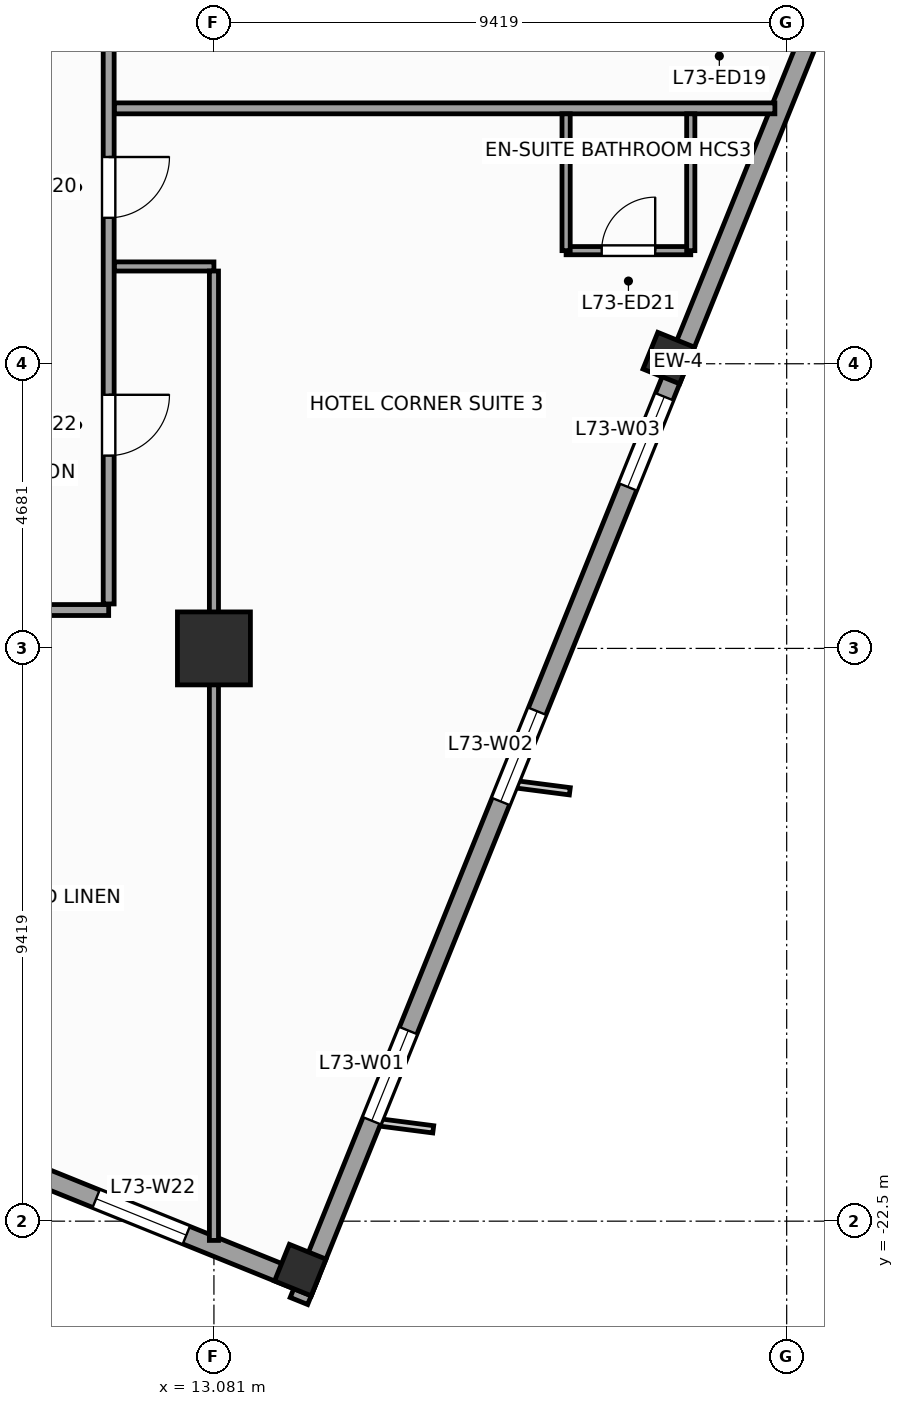
"""IFC4 building model, lengths in metres.
Left out: names, types, materials, properties, quantities, classifications, styles, units other than length and angle.
Written with IfcOpenShell. Run it as: python <this file> out.ifc"""

import sys

from ifc_helpers import new_model, si_unit, direction, frame, frame_2d, origin, origin_2d, place, context, subcontext, project, spatial, rectangle, extrude, source, transform, mapped, element, fill, save


model = new_model("IFC4")
c1 = context("Model", 3, precision=1e-05, world=origin(), true_north=direction((0.0, 1.0)))
c2 = subcontext(c1, "Body", "Model", "MODEL_VIEW")
j1 = project(units=[si_unit("LENGTHUNIT", "METRE"), si_unit("PLANEANGLEUNIT", "RADIAN")], contexts=[c1])
p1 = place(None, origin())
s1 = spatial("IfcSite", under=j1, at=p1, CompositionType="ELEMENT")
p2 = place(p1, origin())
s2 = spatial("IfcBuilding", under=s1, at=p2, CompositionType="ELEMENT")
p3 = place(p2, frame((0.0, 0.0, 297.6)))
s3 = spatial("IfcBuildingStorey", under=s2, at=p3, CompositionType="ELEMENT", Elevation=297.6)
m1 = source(origin(), c2, "Body", "SweptSolid", [
    extrude(rectangle(XDim=1.2, YDim=1.2, at=origin_2d()), origin(), (0.0, 0.0, 1.0), 3.6),
])
p4 = place(p3, frame((13.081, -13.081, 0.0), z_axis=(0.0, 0.0, 1.0), x_axis=(1.0, 0.0, 0.0)))
e1 = element("IfcColumn", 1, at=p4, inside=s3, PredefinedType="COLUMN", context=c2, shape_type="MappedRepresentation", body=[
    mapped(m1, transform((0.0, 0.0, 0.0), scale=1.0)),
])
m2 = source(origin(), c2, "Body", "SweptSolid", [
    extrude(rectangle(XDim=0.65, YDim=0.65, at=origin_2d()), origin(), (0.0, 0.0, 1.0), 3.6),
])
for number, where, z_axis, x_axis in (
    (2, (14.501, -23.304, 0.0), (0.0, 0.0, 1.0), (0.375, 0.927, 0.0)),
    (3, (20.56, -8.307, 0.0), (0.0, 0.0, 1.0), (0.375, 0.927, 0.0)),
):
    element("IfcColumn", number, at=place(p3, frame(where, z_axis=z_axis, x_axis=x_axis)), inside=s3, PredefinedType="COLUMN", context=c2, shape_type="MappedRepresentation", body=[
        mapped(m2, transform((0.0, 0.0, 0.0), scale=1.0)),
    ])
p5 = place(p3, frame((14.479, -23.813, 0.0), z_axis=(0.0, 0.0, 1.0), x_axis=(0.374609557019, 0.927182657188, 0.0)))
e4 = element("IfcWall", 4, at=p5, inside=s3, PredefinedType="STANDARD", context=c2, shape_type="SweptSolid", body=[
    extrude(rectangle(XDim=33.31, YDim=0.31, at=frame_2d((16.655, 0.0))), origin(), (0.0, 0.0, 1.0), 2.75),
])
p6 = place(p5, frame((3.197, 0.0, 0.47)))
e5 = element("IfcOpeningElement", 5, at=p6, cuts=e4, PredefinedType="OPENING", context=c2, shape_type="SweptSolid", body=[
    extrude(rectangle(XDim=1.6, YDim=2.1, at=frame_2d((0.8, 1.05))), frame((0.0, 0.165, 0.0), z_axis=(0.0, -1.0, 0.0), x_axis=(1.0, 0.0, 0.0)), (0.0, 0.0, 1.0), 0.33),
])
p7 = place(p5, frame((8.86, 0.0, 0.47)))
e6 = element("IfcOpeningElement", 6, at=p7, cuts=e4, PredefinedType="OPENING", context=c2, shape_type="SweptSolid", body=[
    extrude(rectangle(XDim=1.6, YDim=2.1, at=frame_2d((0.8, 1.05))), frame((0.0, 0.165, 0.0), z_axis=(0.0, -1.0, 0.0), x_axis=(1.0, 0.0, 0.0)), (0.0, 0.0, 1.0), 0.33),
])
p8 = place(p5, frame((14.439, 0.0, 0.47)))
e7 = element("IfcOpeningElement", 7, at=p8, cuts=e4, PredefinedType="OPENING", context=c2, shape_type="SweptSolid", body=[
    extrude(rectangle(XDim=1.6, YDim=2.1, at=frame_2d((0.8, 1.05))), frame((0.0, 0.165, 0.0), z_axis=(0.0, -1.0, 0.0), x_axis=(1.0, 0.0, 0.0)), (0.0, 0.0, 1.0), 0.33),
])
p9 = place(p5, frame((30.097, 0.0, 0.47)))
e8 = element("IfcOpeningElement", 8, at=p9, cuts=e4, PredefinedType="OPENING", context=c2, shape_type="SweptSolid", body=[
    extrude(rectangle(XDim=1.6, YDim=2.1, at=frame_2d((0.8, 1.05))), frame((0.0, 0.165, 0.0), z_axis=(0.0, -1.0, 0.0), x_axis=(1.0, 0.0, 0.0)), (0.0, 0.0, 1.0), 0.33),
])
p10 = place(p5, frame((27.59, 0.0, 0.47)))
e9 = element("IfcOpeningElement", 9, at=p10, cuts=e4, PredefinedType="OPENING", context=c2, shape_type="SweptSolid", body=[
    extrude(rectangle(XDim=1.6, YDim=2.1, at=frame_2d((0.8, 1.05))), frame((0.0, 0.165, 0.0), z_axis=(0.0, -1.0, 0.0), x_axis=(1.0, 0.0, 0.0)), (0.0, 0.0, 1.0), 0.33),
])
p11 = place(p5, frame((22.952, 0.0, 0.47)))
e10 = element("IfcOpeningElement", 10, at=p11, cuts=e4, PredefinedType="OPENING", context=c2, shape_type="SweptSolid", body=[
    extrude(rectangle(XDim=1.6, YDim=2.1, at=frame_2d((0.8, 1.05))), frame((0.0, 0.165, 0.0), z_axis=(0.0, -1.0, 0.0), x_axis=(1.0, 0.0, 0.0)), (0.0, 0.0, 1.0), 0.33),
])
p12 = place(p3, frame((9.032, -21.278, 0.0), z_axis=(0.0, 0.0, 1.0), x_axis=(0.927185411764, -0.374602739196, 0.0)))
e11 = element("IfcWall", 11, at=p12, inside=s3, PredefinedType="STANDARD", context=c2, shape_type="SweptSolid", body=[
    extrude(rectangle(XDim=6.155, YDim=0.31, at=frame_2d((3.078, 0.0))), origin(), (0.0, 0.0, 1.0), 3.35),
])
p13 = place(p12, frame((2.278, 0.0, 0.47)))
e12 = element("IfcOpeningElement", 12, at=p13, cuts=e11, PredefinedType="OPENING", context=c2, shape_type="SweptSolid", body=[
    extrude(rectangle(XDim=1.6, YDim=2.1, at=frame_2d((0.8, 1.05))), frame((0.0, 0.165, 0.0), z_axis=(0.0, -1.0, 0.0), x_axis=(1.0, 0.0, 0.0)), (0.0, 0.0, 1.0), 0.33),
])
p14 = place(p3, frame((-10.3, -12.45, 0.0), z_axis=(0.0, 0.0, 1.0), x_axis=(1.0, 0.0, 0.0)))
e13 = element("IfcWall", 13, at=p14, inside=s3, PredefinedType="PARTITIONING", context=c2, shape_type="SweptSolid", body=[
    extrude(rectangle(XDim=21.65, YDim=0.18, at=frame_2d((10.825, 0.0))), origin(), (0.0, 0.0, 1.0), 3.35),
])
p15 = place(p14, frame((14.786, 0.0, 0.0)))
e14 = element("IfcOpeningElement", 14, at=p15, cuts=e13, PredefinedType="OPENING", context=c2, shape_type="SweptSolid", body=[
    extrude(rectangle(XDim=0.95, YDim=2.1, at=frame_2d((0.475, 1.05))), frame((0.0, 0.1, 0.0), z_axis=(0.0, -1.0, 0.0), x_axis=(1.0, 0.0, 0.0)), (0.0, 0.0, 1.0), 0.2),
])
p16 = place(p14, frame((9.8, 0.0, 0.0)))
e15 = element("IfcOpeningElement", 15, at=p16, cuts=e13, PredefinedType="OPENING", context=c2, shape_type="SweptSolid", body=[
    extrude(rectangle(XDim=1.0, YDim=2.15, at=frame_2d((0.5, 1.075))), frame((0.0, 0.1, 0.0), z_axis=(0.0, -1.0, 0.0), x_axis=(1.0, 0.0, 0.0)), (0.0, 0.0, 1.0), 0.2),
])
p17 = place(p14, frame((3.064, 0.0, 0.0)))
e16 = element("IfcOpeningElement", 16, at=p17, cuts=e13, PredefinedType="OPENING", context=c2, shape_type="SweptSolid", body=[
    extrude(rectangle(XDim=1.0, YDim=2.15, at=frame_2d((0.5, 1.075))), frame((0.0, 0.1, 0.0), z_axis=(0.0, -1.0, 0.0), x_axis=(1.0, 0.0, 0.0)), (0.0, 0.0, 1.0), 0.2),
])
p18 = place(p3, frame((11.35, -12.35, 0.0), z_axis=(0.0, 0.0, 1.0), x_axis=(0.0, 1.0, 0.0)))
e17 = element("IfcWall", 17, at=p18, inside=s3, PredefinedType="PARTITIONING", context=c2, shape_type="SweptSolid", body=[
    extrude(rectangle(XDim=22.55, YDim=0.18, at=frame_2d((11.275, 0.0))), origin(), (0.0, 0.0, 1.0), 3.35),
])
p19 = place(p18, frame((17.15, 0.0, 0.0)))
e18 = element("IfcOpeningElement", 18, at=p19, cuts=e17, PredefinedType="OPENING", context=c2, shape_type="SweptSolid", body=[
    extrude(rectangle(XDim=1.0, YDim=2.15, at=frame_2d((0.5, 1.075))), frame((0.0, 0.1, 0.0), z_axis=(0.0, -1.0, 0.0), x_axis=(1.0, 0.0, 0.0)), (0.0, 0.0, 1.0), 0.2),
])
p20 = place(p18, frame((13.5, 0.0, 0.0)))
e19 = element("IfcOpeningElement", 19, at=p20, cuts=e17, PredefinedType="OPENING", context=c2, shape_type="SweptSolid", body=[
    extrude(rectangle(XDim=1.0, YDim=2.15, at=frame_2d((0.5, 1.075))), frame((0.0, 0.1, 0.0), z_axis=(0.0, -1.0, 0.0), x_axis=(1.0, 0.0, 0.0)), (0.0, 0.0, 1.0), 0.2),
])
p21 = place(p18, frame((9.5, 0.0, 0.0)))
e20 = element("IfcOpeningElement", 20, at=p21, cuts=e17, PredefinedType="OPENING", context=c2, shape_type="SweptSolid", body=[
    extrude(rectangle(XDim=1.0, YDim=2.15, at=frame_2d((0.5, 1.075))), frame((0.0, 0.1, 0.0), z_axis=(0.0, -1.0, 0.0), x_axis=(1.0, 0.0, 0.0)), (0.0, 0.0, 1.0), 0.2),
])
p22 = place(p18, frame((6.35, 0.0, 0.0)))
e21 = element("IfcOpeningElement", 21, at=p22, cuts=e17, PredefinedType="OPENING", context=c2, shape_type="SweptSolid", body=[
    extrude(rectangle(XDim=1.0, YDim=2.15, at=frame_2d((0.5, 1.075))), frame((0.0, 0.1, 0.0), z_axis=(0.0, -1.0, 0.0), x_axis=(1.0, 0.0, 0.0)), (0.0, 0.0, 1.0), 0.2),
])
p23 = place(p18, frame((2.439, 0.0, 0.0)))
e22 = element("IfcOpeningElement", 22, at=p23, cuts=e17, PredefinedType="OPENING", context=c2, shape_type="SweptSolid", body=[
    extrude(rectangle(XDim=1.0, YDim=2.15, at=frame_2d((0.5, 1.075))), frame((0.0, 0.1, 0.0), z_axis=(0.0, -1.0, 0.0), x_axis=(1.0, 0.0, 0.0)), (0.0, 0.0, 1.0), 0.2),
])
p24 = place(p3, frame((11.445, -4.2, 0.0), z_axis=(0.0, 0.0, 1.0), x_axis=(1.0, 0.0, 0.0)))
e23 = element("IfcWall", 23, at=p24, inside=s3, PredefinedType="PARTITIONING", context=c2, shape_type="SweptSolid", body=[
    extrude(rectangle(XDim=10.861, YDim=0.18, at=frame_2d((5.43, 0.0))), origin(), (0.0, 0.0, 1.0), 3.02),
])
p25 = place(p3, frame((11.445, -6.8, 0.0), z_axis=(0.0, 0.0, 1.0), x_axis=(1.0, 0.0, 0.0)))
e24 = element("IfcWall", 24, at=p25, inside=s3, PredefinedType="PARTITIONING", context=c2, shape_type="SweptSolid", body=[
    extrude(rectangle(XDim=1.636, YDim=0.15, at=frame_2d((0.818, 0.0))), origin(), (0.0, 0.0, 1.0), 3.35),
])
p26 = place(p3, frame((13.081, -6.875, 0.0), z_axis=(0.0, 0.0, 1.0), x_axis=(0.0, -1.0, 0.0)))
e25 = element("IfcWall", 25, at=p26, inside=s3, PredefinedType="PARTITIONING", context=c2, shape_type="SweptSolid", body=[
    extrude(rectangle(XDim=15.942, YDim=0.15, at=frame_2d((7.971, 0.0))), origin(), (0.0, 0.0, 1.0), 2.45),
])
p27 = place(p3, frame((18.873, -6.54, 0.0), z_axis=(0.0, 0.0, 1.0), x_axis=(1.0, 0.0, 0.0)))
e26 = element("IfcWall", 26, at=p27, inside=s3, PredefinedType="PARTITIONING", context=c2, shape_type="SweptSolid", body=[
    extrude(rectangle(XDim=2.05, YDim=0.135, at=frame_2d((1.025, 0.0))), origin(), (0.0, 0.0, 1.0), 3.35),
])
p28 = place(p27, frame((0.585, 0.0, 0.0)))
e27 = element("IfcOpeningElement", 27, at=p28, cuts=e26, PredefinedType="OPENING", context=c2, shape_type="SweptSolid", body=[
    extrude(rectangle(XDim=0.88, YDim=2.1, at=frame_2d((0.44, 1.05))), frame((0.0, 0.078, 0.0), z_axis=(0.0, -1.0, 0.0), x_axis=(1.0, 0.0, 0.0)), (0.0, 0.0, 1.0), 0.155),
])
for number, where, z_axis, x_axis in (
    (28, (20.923, -6.54, 0.0), (0.0, 0.0, 1.0), (0.0, 1.0, 0.0)),
    (29, (18.873, -6.54, 0.0), (0.0, 0.0, 1.0), (0.0, 1.0, 0.0)),
):
    element("IfcWall", number, at=place(p3, frame(where, z_axis=z_axis, x_axis=x_axis)), inside=s3, PredefinedType="PARTITIONING", context=c2, shape_type="SweptSolid", body=[
        extrude(rectangle(XDim=2.25, YDim=0.135, at=frame_2d((1.125, 0.0))), origin(), (0.0, 0.0, 1.0), 3.35),
    ])
m3 = source(origin(), c2, "Body", "SweptSolid", [
    extrude(rectangle(XDim=1.6, YDim=2.1, at=frame_2d((0.8, 1.05))), frame((0.0, 0.03, 0.0), z_axis=(0.0, -1.0, 0.0), x_axis=(1.0, 0.0, 0.0)), (0.0, 0.0, 1.0), 0.06),
])
p29 = place(p6, origin())
e30 = element("IfcWindow", 30, at=p29, inside=s3, PartitioningType="SINGLE_PANEL", PredefinedType="WINDOW", context=c2, shape_type="MappedRepresentation", body=[
    mapped(m3, transform((0.0, 0.0, 0.0), scale=1.0)),
])
fill(e5, e30)
p30 = place(p7, origin())
e31 = element("IfcWindow", 31, at=p30, inside=s3, PartitioningType="SINGLE_PANEL", PredefinedType="WINDOW", context=c2, shape_type="MappedRepresentation", body=[
    mapped(m3, transform((0.0, 0.0, 0.0), scale=1.0)),
])
fill(e6, e31)
p31 = place(p8, origin())
e32 = element("IfcWindow", 32, at=p31, inside=s3, PartitioningType="SINGLE_PANEL", PredefinedType="WINDOW", context=c2, shape_type="MappedRepresentation", body=[
    mapped(m3, transform((0.0, 0.0, 0.0), scale=1.0)),
])
fill(e7, e32)
p32 = place(p13, origin())
e33 = element("IfcWindow", 33, at=p32, inside=s3, PartitioningType="SINGLE_PANEL", PredefinedType="WINDOW", context=c2, shape_type="MappedRepresentation", body=[
    mapped(m3, transform((0.0, 0.0, 0.0), scale=1.0)),
])
fill(e12, e33)
m4 = source(origin(), c2, "Body", "SweptSolid", [
    extrude(rectangle(XDim=1.0, YDim=2.15, at=frame_2d((0.5, 1.075))), frame((0.0, 0.025, 0.0), z_axis=(0.0, -1.0, 0.0), x_axis=(1.0, 0.0, 0.0)), (0.0, 0.0, 1.0), 0.05),
])
p33 = place(p22, frame((1.0, 0.0, 0.0), z_axis=(0.0, 0.0, 1.0), x_axis=(-1.0, 0.0, 0.0)))
e34 = element("IfcDoor", 34, at=p33, inside=s3, OperationType="SINGLE_SWING_RIGHT", PredefinedType="DOOR", context=c2, shape_type="MappedRepresentation", body=[
    mapped(m4, transform((0.0, 0.0, 0.0), scale=1.0)),
])
fill(e21, e34)
m5 = source(origin(), c2, "Body", "SweptSolid", [
    extrude(rectangle(XDim=0.88, YDim=2.1, at=frame_2d((0.44, 1.05))), frame((0.0, 0.025, 0.0), z_axis=(0.0, -1.0, 0.0), x_axis=(1.0, 0.0, 0.0)), (0.0, 0.0, 1.0), 0.05),
])
p34 = place(p28, origin())
e35 = element("IfcDoor", 35, at=p34, inside=s3, OperationType="SINGLE_SWING_RIGHT", PredefinedType="DOOR", context=c2, shape_type="MappedRepresentation", body=[
    mapped(m5, transform((0.0, 0.0, 0.0), scale=1.0)),
])
fill(e27, e35)
p35 = place(p23, frame((1.0, 0.0, 0.0), z_axis=(0.0, 0.0, 1.0), x_axis=(-1.0, 0.0, 0.0)))
e36 = element("IfcDoor", 36, at=p35, inside=s3, OperationType="SINGLE_SWING_RIGHT", PredefinedType="DOOR", context=c2, shape_type="MappedRepresentation", body=[
    mapped(m4, transform((0.0, 0.0, 0.0), scale=1.0)),
])
fill(e22, e36)
save(model, sys.argv[1])
